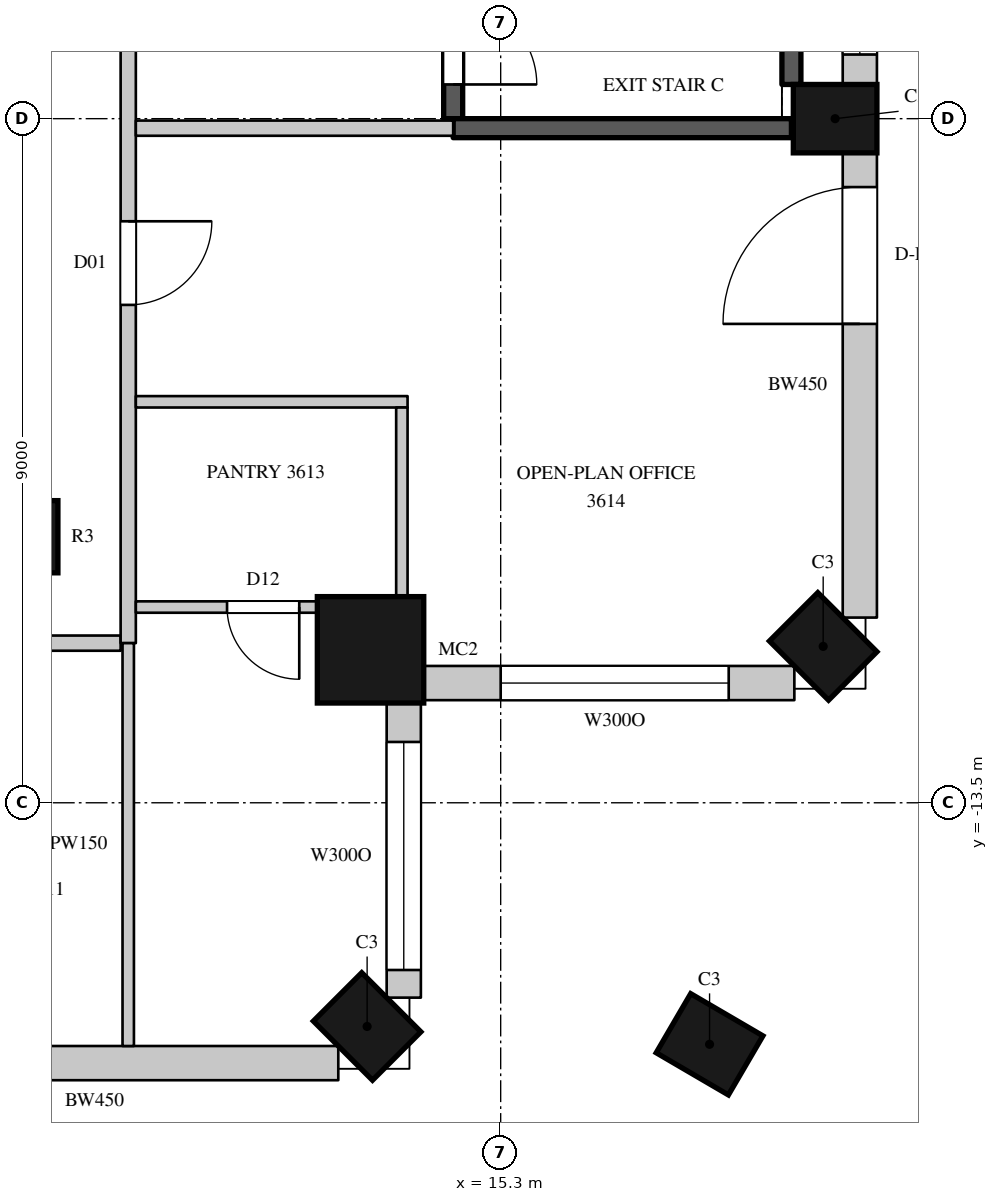
"""IFC4 building model, lengths in metres.
Left out: names, types, materials, properties, quantities, classifications, styles, units other than length and angle.
Written with IfcOpenShell. Run it as: python <this file> out.ifc"""

import sys

from ifc_helpers import new_model, si_unit, direction, frame, frame_2d, origin, origin_2d, place, context, subcontext, project, spatial, rectangle, circle, extrude, element, fill, save


model = new_model("IFC4")
c1 = context("Model", 3, precision=1e-05, world=origin(), true_north=direction((0.0, 1.0)))
c2 = subcontext(c1, "Body", "Model", "MODEL_VIEW")
j1 = project(units=[si_unit("LENGTHUNIT", "METRE"), si_unit("PLANEANGLEUNIT", "RADIAN")], contexts=[c1])
p1 = place(None, origin())
s1 = spatial("IfcSite", under=j1, at=p1, CompositionType="ELEMENT")
p2 = place(p1, origin())
s2 = spatial("IfcBuilding", under=s1, at=p2, CompositionType="ELEMENT")
p3 = place(p2, frame((0.0, 0.0, 168.7)))
s3 = spatial("IfcBuildingStorey", under=s2, at=p3, CompositionType="ELEMENT", Elevation=168.7)
p4 = place(p3, frame((13.543, -16.443, 0.0), z_axis=(0.0, 0.0, 1.0), x_axis=(0.707106781187, 0.707106781187, 0.0)))
e1 = element("IfcColumn", 1, at=p4, inside=s3, PredefinedType="COLUMN", context=c2, shape_type="SweptSolid", body=[
    extrude(rectangle(XDim=0.9, YDim=1.1, at=origin_2d()), origin(), (0.0, 0.0, 1.0), 4.1),
])
p5 = place(p3, frame((13.588, -11.488, 0.0), z_axis=(0.0, 0.0, 1.0), x_axis=(1.0, 0.0, 0.0)))
e2 = element("IfcColumn", 2, at=p5, inside=s3, PredefinedType="COLUMN", context=c2, shape_type="SweptSolid", body=[
    extrude(circle(Radius=0.7, at=origin_2d()), origin(), (0.0, 0.0, 1.0), 4.1),
])
for number, where, z_axis, x_axis in (
    (3, (19.543, -11.443, 0.0), (0.0, 0.0, 1.0), (0.707, 0.707, 0.0)),
    (4, (19.7, -4.5, 0.0), (0.0, 0.0, 1.0), (0.0, 1.0, 0.0)),
    (5, (18.048, -16.677, 0.0), (0.0, 0.0, 1.0), (0.504, 0.863, 0.0)),
):
    element("IfcColumn", number, at=place(p3, frame(where, z_axis=z_axis, x_axis=x_axis)), inside=s3, PredefinedType="COLUMN", context=c2, shape_type="SweptSolid", body=[
        extrude(rectangle(XDim=0.9, YDim=1.1, at=origin_2d()), origin(), (0.0, 0.0, 1.0), 4.1),
    ])
p6 = place(p3, frame((9.0, -10.0, 0.0), z_axis=(0.0, 0.0, 1.0), x_axis=(1.0, 0.0, 0.0)))
e6 = element("IfcColumn", 6, at=p6, inside=s3, PredefinedType="COLUMN", context=c2, shape_type="SweptSolid", body=[
    extrude(circle(Radius=0.475, at=origin_2d()), origin(), (0.0, 0.0, 1.0), 4.1),
])
p7 = place(p3, frame((6.75, -16.925, 0.0), z_axis=(0.0, 0.0, 1.0), x_axis=(1.0, 0.0, 0.0)))
e7 = element("IfcWall", 7, at=p7, inside=s3, PredefinedType="SOLIDWALL", context=c2, shape_type="SweptSolid", body=[
    extrude(rectangle(XDim=6.414, YDim=0.45, at=frame_2d((3.207, 0.0))), origin(), (0.0, 0.0, 1.0), 3.8),
])
p8 = place(p7, frame((0.525, 0.0, 0.0)))
e8 = element("IfcOpeningElement", 8, at=p8, cuts=e7, PredefinedType="OPENING", context=c2, shape_type="SweptSolid", body=[
    extrude(rectangle(XDim=1.8, YDim=2.4, at=frame_2d((0.9, 1.2))), frame((0.0, 0.235, 0.0), z_axis=(0.0, -1.0, 0.0), x_axis=(1.0, 0.0, 0.0)), (0.0, 0.0, 1.0), 0.47),
])
p9 = place(p3, frame((14.025, -16.064, 0.0), z_axis=(0.0, 0.0, 1.0), x_axis=(0.0, 1.0, 0.0)))
e9 = element("IfcWall", 9, at=p9, inside=s3, PredefinedType="SOLIDWALL", context=c2, shape_type="SweptSolid", body=[
    extrude(rectangle(XDim=3.909, YDim=0.45, at=frame_2d((1.955, 0.0))), origin(), (0.0, 0.0, 1.0), 3.8),
])
p10 = place(p9, frame((0.364, 0.0, 1.05)))
e10 = element("IfcOpeningElement", 10, at=p10, cuts=e9, PredefinedType="OPENING", context=c2, shape_type="SweptSolid", body=[
    extrude(rectangle(XDim=3.0, YDim=2.4, at=frame_2d((1.5, 1.2))), frame((0.0, 0.235, 0.0), z_axis=(0.0, -1.0, 0.0), x_axis=(1.0, 0.0, 0.0)), (0.0, 0.0, 1.0), 0.47),
])
p11 = place(p3, frame((14.255, -11.925, 0.0), z_axis=(0.0, 0.0, 1.0), x_axis=(1.0, 0.0, 0.0)))
e11 = element("IfcWall", 11, at=p11, inside=s3, PredefinedType="SOLIDWALL", context=c2, shape_type="SweptSolid", body=[
    extrude(rectangle(XDim=4.909, YDim=0.45, at=frame_2d((2.455, 0.0))), origin(), (0.0, 0.0, 1.0), 3.8),
])
p12 = place(p11, frame((1.045, 0.0, 1.05)))
e12 = element("IfcOpeningElement", 12, at=p12, cuts=e11, PredefinedType="OPENING", context=c2, shape_type="SweptSolid", body=[
    extrude(rectangle(XDim=3.0, YDim=2.4, at=frame_2d((1.5, 1.2))), frame((0.0, 0.235, 0.0), z_axis=(0.0, -1.0, 0.0), x_axis=(1.0, 0.0, 0.0)), (0.0, 0.0, 1.0), 0.47),
])
p13 = place(p3, frame((20.025, -11.064, 0.0), z_axis=(0.0, 0.0, 1.0), x_axis=(0.0, 1.0, 0.0)))
e13 = element("IfcWall", 13, at=p13, inside=s3, PredefinedType="SOLIDWALL", context=c2, shape_type="SweptSolid", body=[
    extrude(rectangle(XDim=6.114, YDim=0.45, at=frame_2d((3.057, 0.0))), origin(), (0.0, 0.0, 1.0), 3.8),
])
p14 = place(p13, frame((3.864, 0.0, 0.0)))
e14 = element("IfcOpeningElement", 14, at=p14, cuts=e13, PredefinedType="OPENING", context=c2, shape_type="SweptSolid", body=[
    extrude(rectangle(XDim=1.8, YDim=2.4, at=frame_2d((0.9, 1.2))), frame((0.0, 0.235, 0.0), z_axis=(0.0, -1.0, 0.0), x_axis=(1.0, 0.0, 0.0)), (0.0, 0.0, 1.0), 0.47),
])
p15 = place(p3, frame((20.025, -4.05, 0.0), z_axis=(0.0, 0.0, 1.0), x_axis=(0.0, 1.0, 0.0)))
e15 = element("IfcWall", 15, at=p15, inside=s3, PredefinedType="SOLIDWALL", context=c2, shape_type="SweptSolid", body=[
    extrude(rectangle(XDim=8.439, YDim=0.45, at=frame_2d((4.219, 0.0))), origin(), (0.0, 0.0, 1.0), 3.8),
])
p16 = place(p15, frame((0.394, 0.0, 1.05)))
e16 = element("IfcOpeningElement", 16, at=p16, cuts=e15, PredefinedType="OPENING", context=c2, shape_type="SweptSolid", body=[
    extrude(rectangle(XDim=3.0, YDim=2.4, at=frame_2d((1.5, 1.2))), frame((0.0, 0.235, 0.0), z_axis=(0.0, -1.0, 0.0), x_axis=(1.0, 0.0, 0.0)), (0.0, 0.0, 1.0), 0.47),
])
p17 = place(p15, frame((5.082, 0.0, 1.05)))
e17 = element("IfcOpeningElement", 17, at=p17, cuts=e15, PredefinedType="OPENING", context=c2, shape_type="SweptSolid", body=[
    extrude(rectangle(XDim=3.0, YDim=2.4, at=frame_2d((1.5, 1.2))), frame((0.0, 0.235, 0.0), z_axis=(0.0, -1.0, 0.0), x_axis=(1.0, 0.0, 0.0)), (0.0, 0.0, 1.0), 0.47),
])
p18 = place(p3, frame((-10.9, -11.4, 0.0), z_axis=(0.0, 0.0, 1.0), x_axis=(1.0, 0.0, 0.0)))
e18 = element("IfcWall", 18, at=p18, inside=s3, PredefinedType="PARTITIONING", context=c2, shape_type="SweptSolid", body=[
    extrude(rectangle(XDim=21.2, YDim=0.2, at=frame_2d((10.6, 0.0))), origin(), (0.0, 0.0, 1.0), 3.8),
])
p19 = place(p18, frame((0.95, 0.0, 0.0)))
e19 = element("IfcOpeningElement", 19, at=p19, cuts=e18, PredefinedType="OPENING", context=c2, shape_type="SweptSolid", body=[
    extrude(rectangle(XDim=0.95, YDim=2.2, at=frame_2d((0.475, 1.1))), frame((0.0, 0.11, 0.0), z_axis=(0.0, -1.0, 0.0), x_axis=(1.0, 0.0, 0.0)), (0.0, 0.0, 1.0), 0.22),
])
p20 = place(p18, frame((4.2, 0.0, 0.0)))
e20 = element("IfcOpeningElement", 20, at=p20, cuts=e18, PredefinedType="OPENING", context=c2, shape_type="SweptSolid", body=[
    extrude(rectangle(XDim=0.95, YDim=2.2, at=frame_2d((0.475, 1.1))), frame((0.0, 0.11, 0.0), z_axis=(0.0, -1.0, 0.0), x_axis=(1.0, 0.0, 0.0)), (0.0, 0.0, 1.0), 0.22),
])
p21 = place(p18, frame((7.1, 0.0, 0.0)))
e21 = element("IfcOpeningElement", 21, at=p21, cuts=e18, PredefinedType="OPENING", context=c2, shape_type="SweptSolid", body=[
    extrude(rectangle(XDim=0.9, YDim=2.2, at=frame_2d((0.45, 1.1))), frame((0.0, 0.11, 0.0), z_axis=(0.0, -1.0, 0.0), x_axis=(1.0, 0.0, 0.0)), (0.0, 0.0, 1.0), 0.22),
])
p22 = place(p18, frame((10.0, 0.0, 0.0)))
e22 = element("IfcOpeningElement", 22, at=p22, cuts=e18, PredefinedType="OPENING", context=c2, shape_type="SweptSolid", body=[
    extrude(rectangle(XDim=0.9, YDim=2.2, at=frame_2d((0.45, 1.1))), frame((0.0, 0.11, 0.0), z_axis=(0.0, -1.0, 0.0), x_axis=(1.0, 0.0, 0.0)), (0.0, 0.0, 1.0), 0.22),
])
p23 = place(p18, frame((13.55, 0.0, 0.0)))
e23 = element("IfcOpeningElement", 23, at=p23, cuts=e18, PredefinedType="OPENING", context=c2, shape_type="SweptSolid", body=[
    extrude(rectangle(XDim=0.9, YDim=2.2, at=frame_2d((0.45, 1.1))), frame((0.0, 0.11, 0.0), z_axis=(0.0, -1.0, 0.0), x_axis=(1.0, 0.0, 0.0)), (0.0, 0.0, 1.0), 0.22),
])
p24 = place(p18, frame((17.85, 0.0, 0.0)))
e24 = element("IfcOpeningElement", 24, at=p24, cuts=e18, PredefinedType="OPENING", context=c2, shape_type="SweptSolid", body=[
    extrude(rectangle(XDim=1.1, YDim=2.4, at=frame_2d((0.55, 1.2))), frame((0.0, 0.11, 0.0), z_axis=(0.0, -1.0, 0.0), x_axis=(1.0, 0.0, 0.0)), (0.0, 0.0, 1.0), 0.22),
])
p25 = place(p3, frame((10.4, -11.4, 0.0), z_axis=(0.0, 0.0, 1.0), x_axis=(0.0, 1.0, 0.0)))
e25 = element("IfcWall", 25, at=p25, inside=s3, PredefinedType="PARTITIONING", context=c2, shape_type="SweptSolid", body=[
    extrude(rectangle(XDim=23.5, YDim=0.2, at=frame_2d((11.75, 0.0))), origin(), (0.0, 0.0, 1.0), 3.8),
])
p26 = place(p25, frame((12.1, 0.0, 0.0)))
e26 = element("IfcOpeningElement", 26, at=p26, cuts=e25, PredefinedType="OPENING", context=c2, shape_type="SweptSolid", body=[
    extrude(rectangle(XDim=1.5, YDim=2.4, at=frame_2d((0.75, 1.2))), frame((0.0, 0.11, 0.0), z_axis=(0.0, -1.0, 0.0), x_axis=(1.0, 0.0, 0.0)), (0.0, 0.0, 1.0), 0.22),
])
p27 = place(p25, frame((19.25, 0.0, 0.0)))
e27 = element("IfcOpeningElement", 27, at=p27, cuts=e25, PredefinedType="OPENING", context=c2, shape_type="SweptSolid", body=[
    extrude(rectangle(XDim=1.1, YDim=2.4, at=frame_2d((0.55, 1.2))), frame((0.0, 0.11, 0.0), z_axis=(0.0, -1.0, 0.0), x_axis=(1.0, 0.0, 0.0)), (0.0, 0.0, 1.0), 0.22),
])
p28 = place(p25, frame((4.45, 0.0, 0.0)))
e28 = element("IfcOpeningElement", 28, at=p28, cuts=e25, PredefinedType="OPENING", context=c2, shape_type="SweptSolid", body=[
    extrude(rectangle(XDim=1.1, YDim=2.4, at=frame_2d((0.55, 1.2))), frame((0.0, 0.11, 0.0), z_axis=(0.0, -1.0, 0.0), x_axis=(1.0, 0.0, 0.0)), (0.0, 0.0, 1.0), 0.22),
])
p29 = place(p3, frame((10.5, -4.625, 0.0), z_axis=(0.0, 0.0, 1.0), x_axis=(1.0, 0.0, 0.0)))
e29 = element("IfcWall", 29, at=p29, inside=s3, PredefinedType="PARTITIONING", context=c2, shape_type="SweptSolid", body=[
    extrude(rectangle(XDim=4.175, YDim=0.2, at=frame_2d((2.087, 0.0))), origin(), (0.0, 0.0, 1.0), 3.8),
])
p30 = place(p3, frame((10.4, -16.7, 0.0), z_axis=(0.0, 0.0, 1.0), x_axis=(0.0, 1.0, 0.0)))
e30 = element("IfcWall", 30, at=p30, inside=s3, PredefinedType="PARTITIONING", context=c2, shape_type="SweptSolid", body=[
    extrude(rectangle(XDim=5.3, YDim=0.15, at=frame_2d((2.65, 0.0))), origin(), (0.0, 0.0, 1.0), 3.8),
])
p31 = place(p3, frame((10.5, -10.925, 0.0), z_axis=(0.0, 0.0, 1.0), x_axis=(1.0, 0.0, 0.0)))
e31 = element("IfcWall", 31, at=p31, inside=s3, PredefinedType="PARTITIONING", context=c2, shape_type="SweptSolid", body=[
    extrude(rectangle(XDim=2.606, YDim=0.15, at=frame_2d((1.303, 0.0))), origin(), (0.0, 0.0, 1.0), 3.8),
])
p32 = place(p31, frame((1.2, 0.0, 0.0)))
e32 = element("IfcOpeningElement", 32, at=p32, cuts=e31, PredefinedType="OPENING", context=c2, shape_type="SweptSolid", body=[
    extrude(rectangle(XDim=0.95, YDim=2.2, at=frame_2d((0.475, 1.1))), frame((0.0, 0.085, 0.0), z_axis=(0.0, -1.0, 0.0), x_axis=(1.0, 0.0, 0.0)), (0.0, 0.0, 1.0), 0.17),
])
p33 = place(p3, frame((10.5, -8.225, 0.0), z_axis=(0.0, 0.0, 1.0), x_axis=(1.0, 0.0, 0.0)))
e33 = element("IfcWall", 33, at=p33, inside=s3, PredefinedType="PARTITIONING", context=c2, shape_type="SweptSolid", body=[
    extrude(rectangle(XDim=3.575, YDim=0.15, at=frame_2d((1.788, 0.0))), origin(), (0.0, 0.0, 1.0), 3.15),
])
p34 = place(p3, frame((14.0, -10.85, 0.0), z_axis=(0.0, 0.0, 1.0), x_axis=(0.0, 1.0, 0.0)))
e34 = element("IfcWall", 34, at=p34, inside=s3, PredefinedType="PARTITIONING", context=c2, shape_type="SweptSolid", body=[
    extrude(rectangle(XDim=2.55, YDim=0.15, at=frame_2d((1.275, 0.0))), origin(), (0.0, 0.0, 1.0), 3.8),
])
p35 = place(p3, frame((14.675, -4.5, 0.0), z_axis=(0.0, 0.0, 1.0), x_axis=(0.0, 1.0, 0.0)))
e35 = element("IfcWall", 35, at=p35, inside=s3, PredefinedType="SHEAR", context=c2, shape_type="SweptSolid", body=[
    extrude(rectangle(XDim=9.0, YDim=0.25, at=frame_2d((4.5, 0.0))), origin(), (0.0, 0.0, 1.0), 3.8),
])
p36 = place(p35, frame((0.45, 0.0, 0.0)))
e36 = element("IfcOpeningElement", 36, at=p36, cuts=e35, PredefinedType="OPENING", context=c2, shape_type="SweptSolid", body=[
    extrude(rectangle(XDim=1.1, YDim=2.2, at=frame_2d((0.55, 1.1))), frame((0.0, 0.135, 0.0), z_axis=(0.0, -1.0, 0.0), x_axis=(1.0, 0.0, 0.0)), (0.0, 0.0, 1.0), 0.27),
])
p37 = place(p3, frame((14.675, -4.625, 0.0), z_axis=(0.0, 0.0, 1.0), x_axis=(1.0, 0.0, 0.0)))
e37 = element("IfcWall", 37, at=p37, inside=s3, PredefinedType="SHEAR", context=c2, shape_type="SweptSolid", body=[
    extrude(rectangle(XDim=4.45, YDim=0.25, at=frame_2d((2.225, 0.0))), origin(), (0.0, 0.0, 1.0), 3.8),
])
p38 = place(p3, frame((19.125, -4.05, 0.0), z_axis=(0.0, 0.0, 1.0), x_axis=(0.0, 1.0, 0.0)))
e38 = element("IfcWall", 38, at=p38, inside=s3, PredefinedType="SHEAR", context=c2, shape_type="SweptSolid", body=[
    extrude(rectangle(XDim=8.477, YDim=0.25, at=frame_2d((4.238, 0.0))), origin(), (0.0, 0.0, 1.0), 3.8),
])
p39 = place(p10, origin())
e39 = element("IfcWindow", 39, at=p39, inside=s3, PartitioningType="SINGLE_PANEL", PredefinedType="WINDOW", context=c2, shape_type="SweptSolid", body=[
    extrude(rectangle(XDim=3.0, YDim=2.4, at=frame_2d((1.5, 1.2))), frame((0.0, 0.135, 0.0), z_axis=(0.0, -1.0, 0.0), x_axis=(1.0, 0.0, 0.0)), (0.0, 0.0, 1.0), 0.06),
])
fill(e10, e39)
p40 = place(p12, origin())
e40 = element("IfcWindow", 40, at=p40, inside=s3, PartitioningType="SINGLE_PANEL", PredefinedType="WINDOW", context=c2, shape_type="SweptSolid", body=[
    extrude(rectangle(XDim=3.0, YDim=2.4, at=frame_2d((1.5, 1.2))), frame((0.0, 0.135, 0.0), z_axis=(0.0, -1.0, 0.0), x_axis=(1.0, 0.0, 0.0)), (0.0, 0.0, 1.0), 0.06),
])
fill(e12, e40)
p41 = place(p14, origin())
e41 = element("IfcDoor", 41, at=p41, inside=s3, OperationType="SLIDING_TO_LEFT", PredefinedType="DOOR", context=c2, shape_type="SweptSolid", body=[
    extrude(rectangle(XDim=1.8, YDim=2.4, at=frame_2d((0.9, 1.2))), frame((0.0, 0.13, 0.0), z_axis=(0.0, -1.0, 0.0), x_axis=(1.0, 0.0, 0.0)), (0.0, 0.0, 1.0), 0.05),
])
fill(e14, e41)
p42 = place(p16, origin())
e42 = element("IfcWindow", 42, at=p42, inside=s3, PartitioningType="SINGLE_PANEL", PredefinedType="WINDOW", context=c2, shape_type="SweptSolid", body=[
    extrude(rectangle(XDim=3.0, YDim=2.4, at=frame_2d((1.5, 1.2))), frame((0.0, 0.135, 0.0), z_axis=(0.0, -1.0, 0.0), x_axis=(1.0, 0.0, 0.0)), (0.0, 0.0, 1.0), 0.06),
])
fill(e16, e42)
p43 = place(p28, origin())
e43 = element("IfcDoor", 43, at=p43, inside=s3, OperationType="SINGLE_SWING_LEFT", PredefinedType="DOOR", context=c2, shape_type="SweptSolid", body=[
    extrude(rectangle(XDim=1.1, YDim=2.4, at=frame_2d((0.55, 1.2))), frame((0.0, 0.025, 0.0), z_axis=(0.0, -1.0, 0.0), x_axis=(1.0, 0.0, 0.0)), (0.0, 0.0, 1.0), 0.05),
])
fill(e28, e43)
p44 = place(p32, origin())
e44 = element("IfcDoor", 44, at=p44, inside=s3, OperationType="SINGLE_SWING_LEFT", PredefinedType="DOOR", context=c2, shape_type="SweptSolid", body=[
    extrude(rectangle(XDim=0.95, YDim=2.2, at=frame_2d((0.475, 1.1))), frame((0.0, 0.025, 0.0), z_axis=(0.0, -1.0, 0.0), x_axis=(1.0, 0.0, 0.0)), (0.0, 0.0, 1.0), 0.05),
])
fill(e32, e44)
p45 = place(p36, origin())
e45 = element("IfcDoor", 45, at=p45, inside=s3, OperationType="SINGLE_SWING_RIGHT", PredefinedType="DOOR", context=c2, shape_type="SweptSolid", body=[
    extrude(rectangle(XDim=1.1, YDim=2.2, at=frame_2d((0.55, 1.1))), frame((0.0, 0.025, 0.0), z_axis=(0.0, -1.0, 0.0), x_axis=(1.0, 0.0, 0.0)), (0.0, 0.0, 1.0), 0.05),
])
fill(e36, e45)
save(model, sys.argv[1])
